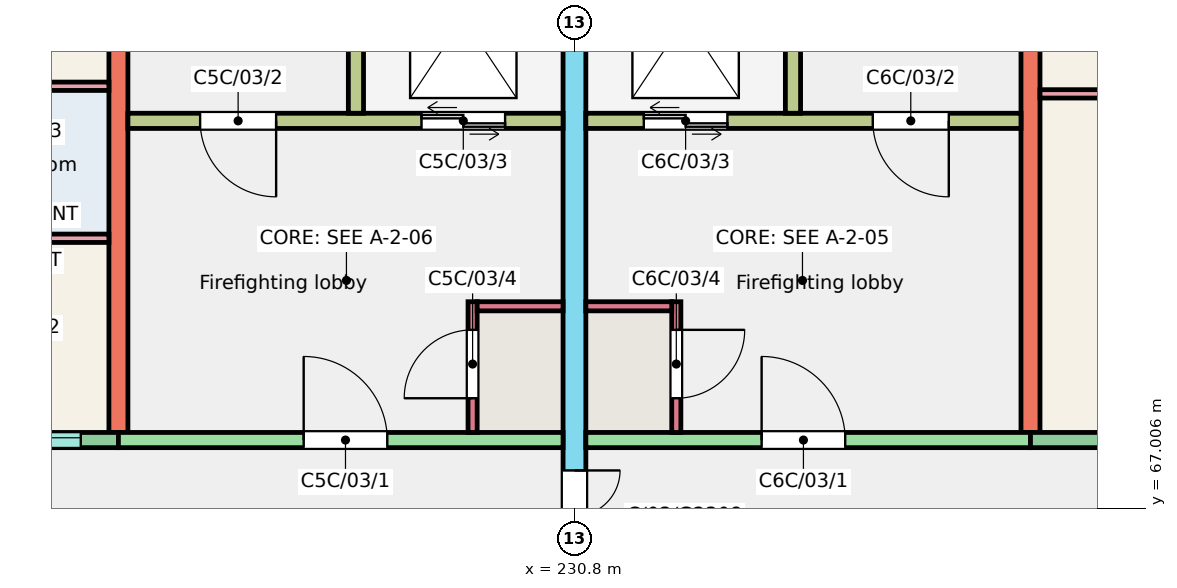
"""IFC4 building model, lengths in metres.
Left out: names, types, materials, properties, quantities, classifications, styles, units other than length and angle.
Written with IfcOpenShell. Run it as: python <this file> out.ifc"""

import sys

from ifc_helpers import new_model, si_unit, direction, frame, frame_2d, origin, place, context, subcontext, project, spatial, rectangle, extrude, element, fill, save


model = new_model("IFC4")
c1 = context("Model", 3, precision=1e-05, world=origin(), true_north=direction((0.0, 1.0)))
c2 = subcontext(c1, "Body", "Model", "MODEL_VIEW")
j1 = project(units=[si_unit("LENGTHUNIT", "METRE"), si_unit("PLANEANGLEUNIT", "RADIAN")], contexts=[c1])
p1 = place(None, origin())
s1 = spatial("IfcSite", under=j1, at=p1, CompositionType="ELEMENT")
p2 = place(p1, origin())
s2 = spatial("IfcBuilding", under=s1, at=p2, CompositionType="ELEMENT")
p3 = place(p2, frame((0.0, 0.0, 9.0)))
s3 = spatial("IfcBuildingStorey", under=s2, at=p3, CompositionType="ELEMENT", Elevation=9.0)
p4 = place(p3, frame((224.8, 68.0, 0.0), z_axis=(0.0, 0.0, 1.0), x_axis=(0.0, 1.0, 0.0)))
e1 = element("IfcWall", 1, at=p4, inside=s3, PredefinedType="SHEAR", context=c2, shape_type="SweptSolid", body=[
    extrude(rectangle(XDim=9.0, YDim=0.25, at=frame_2d((4.5, 0.0))), origin(), (0.0, 0.0, 1.0), 3.0),
])
p5 = place(p3, frame((230.8, 66.0, 0.0), z_axis=(0.0, 0.0, 1.0), x_axis=(0.0, 1.0, 0.0)))
e2 = element("IfcWall", 2, at=p5, inside=s3, PredefinedType="SHEAR", context=c2, shape_type="SweptSolid", body=[
    extrude(rectangle(XDim=11.0, YDim=0.3, at=frame_2d((5.5, 0.0))), origin(), (0.0, 0.0, 1.0), 3.0),
])
p6 = place(p5, frame((0.3, 0.0, 0.0)))
e3 = element("IfcOpeningElement", 3, at=p6, cuts=e2, PredefinedType="OPENING", context=c2, shape_type="SweptSolid", body=[
    extrude(rectangle(XDim=1.2, YDim=2.1, at=frame_2d((0.6, 1.05))), frame((0.0, 0.16, 0.0), z_axis=(0.0, -1.0, 0.0), x_axis=(1.0, 0.0, 0.0)), (0.0, 0.0, 1.0), 0.32),
])
p7 = place(p3, frame((236.8, 68.0, 0.0), z_axis=(0.0, 0.0, 1.0), x_axis=(0.0, 1.0, 0.0)))
e4 = element("IfcWall", 4, at=p7, inside=s3, PredefinedType="SHEAR", context=c2, shape_type="SweptSolid", body=[
    extrude(rectangle(XDim=9.0, YDim=0.25, at=frame_2d((4.5, 0.0))), origin(), (0.0, 0.0, 1.0), 3.0),
])
p8 = place(p3, frame((221.2, 67.9, 0.0), z_axis=(0.0, 0.0, 1.0), x_axis=(1.0, 0.0, 0.0)))
e5 = element("IfcWall", 5, at=p8, inside=s3, PredefinedType="SOLIDWALL", context=c2, shape_type="SweptSolid", body=[
    extrude(rectangle(XDim=3.6, YDim=0.2, at=frame_2d((1.8, 0.0))), origin(), (0.0, 0.0, 1.0), 3.0),
])
p9 = place(p8, frame((1.905, 0.0, 1.1)))
e6 = element("IfcOpeningElement", 6, at=p9, cuts=e5, PredefinedType="OPENING", context=c2, shape_type="SweptSolid", body=[
    extrude(rectangle(XDim=1.2, YDim=1.3, at=frame_2d((0.6, 0.65))), frame((0.0, 0.11, 0.0), z_axis=(0.0, -1.0, 0.0), x_axis=(1.0, 0.0, 0.0)), (0.0, 0.0, 1.0), 0.22),
])
p10 = place(p8, frame((0.275, 0.0, 0.0)))
e7 = element("IfcOpeningElement", 7, at=p10, cuts=e5, PredefinedType="OPENING", context=c2, shape_type="SweptSolid", body=[
    extrude(rectangle(XDim=1.0, YDim=2.1, at=frame_2d((0.5, 1.05))), frame((0.0, 0.11, 0.0), z_axis=(0.0, -1.0, 0.0), x_axis=(1.0, 0.0, 0.0)), (0.0, 0.0, 1.0), 0.22),
])
p11 = place(p3, frame((224.8, 67.9, 0.0), z_axis=(0.0, 0.0, 1.0), x_axis=(1.0, 0.0, 0.0)))
e8 = element("IfcWall", 8, at=p11, inside=s3, PredefinedType="SHEAR", context=c2, shape_type="SweptSolid", body=[
    extrude(rectangle(XDim=5.85, YDim=0.2, at=frame_2d((2.925, 0.0))), origin(), (0.0, 0.0, 1.0), 3.0),
])
p12 = place(p11, frame((2.438, 0.0, 0.0)))
e9 = element("IfcOpeningElement", 9, at=p12, cuts=e8, PredefinedType="OPENING", context=c2, shape_type="SweptSolid", body=[
    extrude(rectangle(XDim=1.1, YDim=2.1, at=frame_2d((0.55, 1.05))), frame((0.0, 0.11, 0.0), z_axis=(0.0, -1.0, 0.0), x_axis=(1.0, 0.0, 0.0)), (0.0, 0.0, 1.0), 0.22),
])
p13 = place(p3, frame((224.925, 72.1, 0.0), z_axis=(0.0, 0.0, 1.0), x_axis=(1.0, 0.0, 0.0)))
e10 = element("IfcWall", 10, at=p13, inside=s3, PredefinedType="SHEAR", context=c2, shape_type="SweptSolid", body=[
    extrude(rectangle(XDim=5.725, YDim=0.2, at=frame_2d((2.862, 0.0))), origin(), (0.0, 0.0, 1.0), 3.0),
])
p14 = place(p13, frame((0.95, 0.0, 0.0)))
e11 = element("IfcOpeningElement", 11, at=p14, cuts=e10, PredefinedType="OPENING", context=c2, shape_type="SweptSolid", body=[
    extrude(rectangle(XDim=1.0, YDim=2.1, at=frame_2d((0.5, 1.05))), frame((0.0, 0.11, 0.0), z_axis=(0.0, -1.0, 0.0), x_axis=(1.0, 0.0, 0.0)), (0.0, 0.0, 1.0), 0.22),
])
p15 = place(p13, frame((3.863, 0.0, 0.0)))
e12 = element("IfcOpeningElement", 12, at=p15, cuts=e10, PredefinedType="OPENING", context=c2, shape_type="SweptSolid", body=[
    extrude(rectangle(XDim=1.1, YDim=2.1, at=frame_2d((0.55, 1.05))), frame((0.0, 0.11, 0.0), z_axis=(0.0, -1.0, 0.0), x_axis=(1.0, 0.0, 0.0)), (0.0, 0.0, 1.0), 0.22),
])
p16 = place(p3, frame((227.925, 72.2, 0.0), z_axis=(0.0, 0.0, 1.0), x_axis=(0.0, 1.0, 0.0)))
e13 = element("IfcWall", 13, at=p16, inside=s3, PredefinedType="SHEAR", context=c2, shape_type="SweptSolid", body=[
    extrude(rectangle(XDim=4.8, YDim=0.2, at=frame_2d((2.4, 0.0))), origin(), (0.0, 0.0, 1.0), 3.0),
])
p17 = place(p3, frame((229.46, 68.0, 0.0), z_axis=(0.0, 0.0, 1.0), x_axis=(0.0, 1.0, 0.0)))
e14 = element("IfcWall", 14, at=p17, inside=s3, PredefinedType="SHEAR", context=c2, shape_type="SweptSolid", body=[
    extrude(rectangle(XDim=1.72, YDim=0.12, at=frame_2d((0.86, 0.0))), origin(), (0.0, 0.0, 1.0), 3.0),
])
p18 = place(p17, frame((0.45, 0.0, 0.0)))
e15 = element("IfcOpeningElement", 15, at=p18, cuts=e14, PredefinedType="OPENING", context=c2, shape_type="SweptSolid", body=[
    extrude(rectangle(XDim=0.9, YDim=2.1, at=frame_2d((0.45, 1.05))), frame((0.0, 0.07, 0.0), z_axis=(0.0, -1.0, 0.0), x_axis=(1.0, 0.0, 0.0)), (0.0, 0.0, 1.0), 0.14),
])
p19 = place(p3, frame((229.52, 69.66, 0.0), z_axis=(0.0, 0.0, 1.0), x_axis=(1.0, 0.0, 0.0)))
e16 = element("IfcWall", 16, at=p19, inside=s3, PredefinedType="SHEAR", context=c2, shape_type="SweptSolid", body=[
    extrude(rectangle(XDim=1.13, YDim=0.12, at=frame_2d((0.565, 0.0))), origin(), (0.0, 0.0, 1.0), 3.0),
])
p20 = place(p3, frame((230.95, 67.9, 0.0), z_axis=(0.0, 0.0, 1.0), x_axis=(1.0, 0.0, 0.0)))
e17 = element("IfcWall", 17, at=p20, inside=s3, PredefinedType="SHEAR", context=c2, shape_type="SweptSolid", body=[
    extrude(rectangle(XDim=5.85, YDim=0.2, at=frame_2d((2.925, 0.0))), origin(), (0.0, 0.0, 1.0), 3.0),
])
p21 = place(p20, frame((2.312, 0.0, 0.0)))
e18 = element("IfcOpeningElement", 18, at=p21, cuts=e17, PredefinedType="OPENING", context=c2, shape_type="SweptSolid", body=[
    extrude(rectangle(XDim=1.1, YDim=2.1, at=frame_2d((0.55, 1.05))), frame((0.0, 0.11, 0.0), z_axis=(0.0, -1.0, 0.0), x_axis=(1.0, 0.0, 0.0)), (0.0, 0.0, 1.0), 0.22),
])
p22 = place(p3, frame((230.95, 72.1, 0.0), z_axis=(0.0, 0.0, 1.0), x_axis=(1.0, 0.0, 0.0)))
e19 = element("IfcWall", 19, at=p22, inside=s3, PredefinedType="SHEAR", context=c2, shape_type="SweptSolid", body=[
    extrude(rectangle(XDim=5.725, YDim=0.2, at=frame_2d((2.863, 0.0))), origin(), (0.0, 0.0, 1.0), 3.0),
])
p23 = place(p22, frame((3.775, 0.0, 0.0)))
e20 = element("IfcOpeningElement", 20, at=p23, cuts=e19, PredefinedType="OPENING", context=c2, shape_type="SweptSolid", body=[
    extrude(rectangle(XDim=1.0, YDim=2.1, at=frame_2d((0.5, 1.05))), frame((0.0, 0.11, 0.0), z_axis=(0.0, -1.0, 0.0), x_axis=(1.0, 0.0, 0.0)), (0.0, 0.0, 1.0), 0.22),
])
p24 = place(p22, frame((0.762, 0.0, 0.0)))
e21 = element("IfcOpeningElement", 21, at=p24, cuts=e19, PredefinedType="OPENING", context=c2, shape_type="SweptSolid", body=[
    extrude(rectangle(XDim=1.1, YDim=2.1, at=frame_2d((0.55, 1.05))), frame((0.0, 0.11, 0.0), z_axis=(0.0, -1.0, 0.0), x_axis=(1.0, 0.0, 0.0)), (0.0, 0.0, 1.0), 0.22),
])
p25 = place(p3, frame((233.675, 72.2, 0.0), z_axis=(0.0, 0.0, 1.0), x_axis=(0.0, 1.0, 0.0)))
e22 = element("IfcWall", 22, at=p25, inside=s3, PredefinedType="SHEAR", context=c2, shape_type="SweptSolid", body=[
    extrude(rectangle(XDim=4.8, YDim=0.2, at=frame_2d((2.4, 0.0))), origin(), (0.0, 0.0, 1.0), 3.0),
])
p26 = place(p3, frame((232.14, 68.0, 0.0), z_axis=(0.0, 0.0, 1.0), x_axis=(0.0, 1.0, 0.0)))
e23 = element("IfcWall", 23, at=p26, inside=s3, PredefinedType="SHEAR", context=c2, shape_type="SweptSolid", body=[
    extrude(rectangle(XDim=1.72, YDim=0.12, at=frame_2d((0.86, 0.0))), origin(), (0.0, 0.0, 1.0), 3.0),
])
p27 = place(p26, frame((0.45, 0.0, 0.0)))
e24 = element("IfcOpeningElement", 24, at=p27, cuts=e23, PredefinedType="OPENING", context=c2, shape_type="SweptSolid", body=[
    extrude(rectangle(XDim=0.9, YDim=2.1, at=frame_2d((0.45, 1.05))), frame((0.0, 0.07, 0.0), z_axis=(0.0, -1.0, 0.0), x_axis=(1.0, 0.0, 0.0)), (0.0, 0.0, 1.0), 0.14),
])
p28 = place(p3, frame((230.95, 69.66, 0.0), z_axis=(0.0, 0.0, 1.0), x_axis=(1.0, 0.0, 0.0)))
e25 = element("IfcWall", 25, at=p28, inside=s3, PredefinedType="SHEAR", context=c2, shape_type="SweptSolid", body=[
    extrude(rectangle(XDim=1.13, YDim=0.12, at=frame_2d((0.565, 0.0))), origin(), (0.0, 0.0, 1.0), 3.0),
])
p29 = place(p3, frame((236.8, 67.9, 0.0), z_axis=(0.0, 0.0, 1.0), x_axis=(1.0, 0.0, 0.0)))
e26 = element("IfcWall", 26, at=p29, inside=s3, PredefinedType="SOLIDWALL", context=c2, shape_type="SweptSolid", body=[
    extrude(rectangle(XDim=3.6, YDim=0.2, at=frame_2d((1.8, 0.0))), origin(), (0.0, 0.0, 1.0), 3.0),
])
p30 = place(p29, frame((1.062, 0.0, 0.9)))
e27 = element("IfcOpeningElement", 27, at=p30, cuts=e26, PredefinedType="OPENING", context=c2, shape_type="SweptSolid", body=[
    extrude(rectangle(XDim=1.5, YDim=1.5, at=frame_2d((0.75, 0.75))), frame((0.0, 0.11, 0.0), z_axis=(0.0, -1.0, 0.0), x_axis=(1.0, 0.0, 0.0)), (0.0, 0.0, 1.0), 0.22),
])
p31 = place(p3, frame((222.735, 70.555, 0.0), z_axis=(0.0, 0.0, 1.0), x_axis=(1.0, 0.0, 0.0)))
e28 = element("IfcWall", 28, at=p31, inside=s3, PredefinedType="PARTITIONING", context=c2, shape_type="SweptSolid", body=[
    extrude(rectangle(XDim=1.94, YDim=0.11, at=frame_2d((0.97, 0.0))), origin(), (0.0, 0.0, 1.0), 2.8),
])
p32 = place(p3, frame((221.325, 72.555, 0.0), z_axis=(0.0, 0.0, 1.0), x_axis=(1.0, 0.0, 0.0)))
e29 = element("IfcWall", 29, at=p32, inside=s3, PredefinedType="PARTITIONING", context=c2, shape_type="SweptSolid", body=[
    extrude(rectangle(XDim=3.35, YDim=0.11, at=frame_2d((1.675, 0.0))), origin(), (0.0, 0.0, 1.0), 2.8),
])
p33 = place(p32, frame((0.2, 0.0, 0.0)))
e30 = element("IfcOpeningElement", 30, at=p33, cuts=e29, PredefinedType="OPENING", context=c2, shape_type="SweptSolid", body=[
    extrude(rectangle(XDim=0.9, YDim=2.1, at=frame_2d((0.45, 1.05))), frame((0.0, 0.065, 0.0), z_axis=(0.0, -1.0, 0.0), x_axis=(1.0, 0.0, 0.0)), (0.0, 0.0, 1.0), 0.13),
])
p34 = place(p3, frame((236.925, 72.455, 0.0), z_axis=(0.0, 0.0, 1.0), x_axis=(1.0, 0.0, 0.0)))
e31 = element("IfcWall", 31, at=p34, inside=s3, PredefinedType="PARTITIONING", context=c2, shape_type="SweptSolid", body=[
    extrude(rectangle(XDim=3.375, YDim=0.11, at=frame_2d((1.688, 0.0))), origin(), (0.0, 0.0, 1.0), 2.8),
])
p35 = place(p9, origin())
e32 = element("IfcWindow", 32, at=p35, inside=s3, PartitioningType="SINGLE_PANEL", PredefinedType="WINDOW", context=c2, shape_type="SweptSolid", body=[
    extrude(rectangle(XDim=1.2, YDim=1.3, at=frame_2d((0.6, 0.65))), frame((0.0, 0.06, 0.0), z_axis=(0.0, -1.0, 0.0), x_axis=(1.0, 0.0, 0.0)), (0.0, 0.0, 1.0), 0.06),
])
fill(e6, e32)
p36 = place(p12, origin())
e33 = element("IfcDoor", 33, at=p36, inside=s3, OperationType="SINGLE_SWING_LEFT", PredefinedType="DOOR", context=c2, shape_type="SweptSolid", body=[
    extrude(rectangle(XDim=1.1, YDim=2.1, at=frame_2d((0.55, 1.05))), frame((0.0, 0.025, 0.0), z_axis=(0.0, -1.0, 0.0), x_axis=(1.0, 0.0, 0.0)), (0.0, 0.0, 1.0), 0.05),
])
fill(e9, e33)
p37 = place(p14, origin())
e34 = element("IfcDoor", 34, at=p37, inside=s3, OperationType="SINGLE_SWING_RIGHT", PredefinedType="DOOR", context=c2, shape_type="SweptSolid", body=[
    extrude(rectangle(XDim=1.0, YDim=2.1, at=frame_2d((0.5, 1.05))), frame((0.0, 0.025, 0.0), z_axis=(0.0, -1.0, 0.0), x_axis=(1.0, 0.0, 0.0)), (0.0, 0.0, 1.0), 0.05),
])
fill(e11, e34)
p38 = place(p15, origin())
e35 = element("IfcDoor", 35, at=p38, inside=s3, OperationType="DOUBLE_DOOR_SLIDING", PredefinedType="DOOR", context=c2, shape_type="SweptSolid", body=[
    extrude(rectangle(XDim=1.1, YDim=2.1, at=frame_2d((0.55, 1.05))), frame((0.0, 0.025, 0.0), z_axis=(0.0, -1.0, 0.0), x_axis=(1.0, 0.0, 0.0)), (0.0, 0.0, 1.0), 0.05),
])
fill(e12, e35)
p39 = place(p18, origin())
e36 = element("IfcDoor", 36, at=p39, inside=s3, OperationType="SINGLE_SWING_LEFT", PredefinedType="DOOR", context=c2, shape_type="SweptSolid", body=[
    extrude(rectangle(XDim=0.9, YDim=2.1, at=frame_2d((0.45, 1.05))), frame((0.0, 0.025, 0.0), z_axis=(0.0, -1.0, 0.0), x_axis=(1.0, 0.0, 0.0)), (0.0, 0.0, 1.0), 0.05),
])
fill(e15, e36)
p40 = place(p21, origin())
e37 = element("IfcDoor", 37, at=p40, inside=s3, OperationType="SINGLE_SWING_LEFT", PredefinedType="DOOR", context=c2, shape_type="SweptSolid", body=[
    extrude(rectangle(XDim=1.1, YDim=2.1, at=frame_2d((0.55, 1.05))), frame((0.0, 0.025, 0.0), z_axis=(0.0, -1.0, 0.0), x_axis=(1.0, 0.0, 0.0)), (0.0, 0.0, 1.0), 0.05),
])
fill(e18, e37)
p41 = place(p23, origin())
e38 = element("IfcDoor", 38, at=p41, inside=s3, OperationType="SINGLE_SWING_RIGHT", PredefinedType="DOOR", context=c2, shape_type="SweptSolid", body=[
    extrude(rectangle(XDim=1.0, YDim=2.1, at=frame_2d((0.5, 1.05))), frame((0.0, 0.025, 0.0), z_axis=(0.0, -1.0, 0.0), x_axis=(1.0, 0.0, 0.0)), (0.0, 0.0, 1.0), 0.05),
])
fill(e20, e38)
p42 = place(p24, origin())
e39 = element("IfcDoor", 39, at=p42, inside=s3, OperationType="DOUBLE_DOOR_SLIDING", PredefinedType="DOOR", context=c2, shape_type="SweptSolid", body=[
    extrude(rectangle(XDim=1.1, YDim=2.1, at=frame_2d((0.55, 1.05))), frame((0.0, 0.025, 0.0), z_axis=(0.0, -1.0, 0.0), x_axis=(1.0, 0.0, 0.0)), (0.0, 0.0, 1.0), 0.05),
])
fill(e21, e39)
p43 = place(p27, origin())
e40 = element("IfcDoor", 40, at=p43, inside=s3, OperationType="SINGLE_SWING_RIGHT", PredefinedType="DOOR", context=c2, shape_type="SweptSolid", body=[
    extrude(rectangle(XDim=0.9, YDim=2.1, at=frame_2d((0.45, 1.05))), frame((0.0, 0.025, 0.0), z_axis=(0.0, -1.0, 0.0), x_axis=(1.0, 0.0, 0.0)), (0.0, 0.0, 1.0), 0.05),
])
fill(e24, e40)
p44 = place(p6, origin())
e41 = element("IfcDoor", 41, at=p44, inside=s3, OperationType="DOUBLE_DOOR_SINGLE_SWING", PredefinedType="DOOR", context=c2, shape_type="SweptSolid", body=[
    extrude(rectangle(XDim=1.2, YDim=2.1, at=frame_2d((0.6, 1.05))), frame((0.0, 0.025, 0.0), z_axis=(0.0, -1.0, 0.0), x_axis=(1.0, 0.0, 0.0)), (0.0, 0.0, 1.0), 0.05),
])
fill(e3, e41)
save(model, sys.argv[1])
